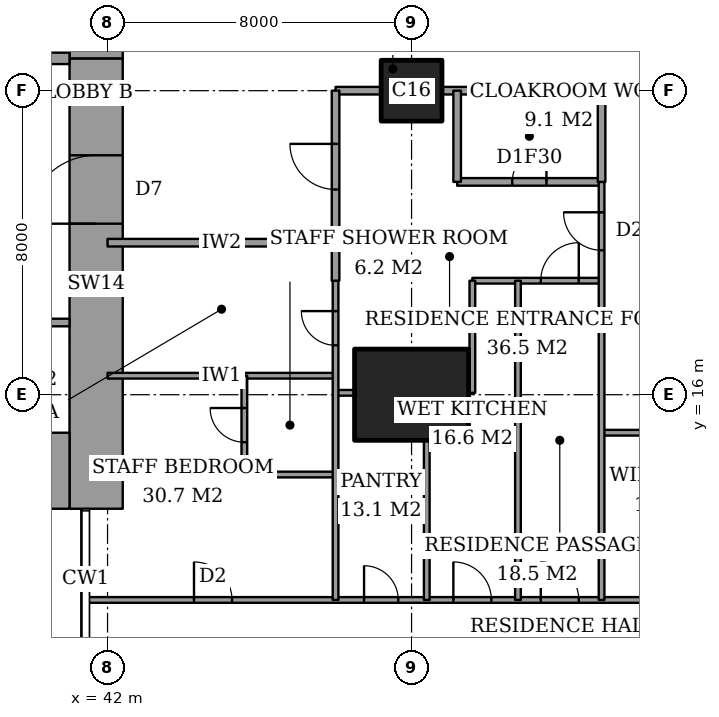
"""IFC4 building model, lengths in metres.
Left out: names, types, materials, properties, quantities, classifications, styles, units other than length and angle.
Written with IfcOpenShell. Run it as: python <this file> out.ifc"""

import sys

from ifc_helpers import new_model, si_unit, direction, frame, frame_2d, origin, origin_2d, place, context, subcontext, project, spatial, rectangle, extrude, element, fill, save


model = new_model("IFC4")
c1 = context("Model", 3, precision=1e-05, world=origin(), true_north=direction((0.0, 1.0)))
c2 = subcontext(c1, "Body", "Model", "MODEL_VIEW")
j1 = project(units=[si_unit("LENGTHUNIT", "METRE"), si_unit("PLANEANGLEUNIT", "RADIAN")], contexts=[c1])
p1 = place(None, origin())
s1 = spatial("IfcSite", under=j1, at=p1, CompositionType="ELEMENT")
p2 = place(p1, origin())
s2 = spatial("IfcBuilding", under=s1, at=p2, CompositionType="ELEMENT")
p3 = place(p2, frame((0.0, 0.0, 244.8)))
s3 = spatial("IfcBuildingStorey", under=s2, at=p3, CompositionType="ELEMENT", Elevation=244.8)
p4 = place(p3, frame((50.0, 16.0, 0.0), z_axis=(0.0, 0.0, 1.0), x_axis=(1.0, 0.0, 0.0)))
e1 = element("IfcColumn", 1, at=p4, inside=s3, PredefinedType="COLUMN", context=c2, shape_type="SweptSolid", body=[
    extrude(rectangle(XDim=3.0, YDim=2.4, at=origin_2d()), origin(), (0.0, 0.0, 1.0), 3.6),
])
p5 = place(p3, frame((50.0, 24.0, 0.0), z_axis=(0.0, 0.0, 1.0), x_axis=(1.0, 0.0, 0.0)))
e2 = element("IfcColumn", 2, at=p5, inside=s3, PredefinedType="COLUMN", context=c2, shape_type="SweptSolid", body=[
    extrude(rectangle(XDim=1.6, YDim=1.6, at=origin_2d()), origin(), (0.0, 0.0, 1.0), 3.6),
])
p6 = place(p3, frame((37.85, 14.0, 0.0), z_axis=(0.0, 0.0, 1.0), x_axis=(1.0, 0.0, 0.0)))
e3 = element("IfcWall", 3, at=p6, inside=s3, PredefinedType="SHEAR", context=c2, shape_type="SweptSolid", body=[
    extrude(rectangle(XDim=3.15, YDim=2.0, at=frame_2d((1.575, 0.0))), origin(), (0.0, 0.0, 1.0), 3.6),
])
p7 = place(p3, frame((41.7, 13.0, 0.0), z_axis=(0.0, 0.0, 1.0), x_axis=(0.0, 1.0, 0.0)))
e4 = element("IfcWall", 4, at=p7, inside=s3, PredefinedType="SHEAR", context=c2, shape_type="SweptSolid", body=[
    extrude(rectangle(XDim=11.85, YDim=1.4, at=frame_2d((5.925, 0.0))), origin(), (0.0, 0.0, 1.0), 3.6),
])
p8 = place(p7, frame((7.5, 0.0, 0.0)))
e5 = element("IfcOpeningElement", 5, at=p8, cuts=e4, PredefinedType="OPENING", context=c2, shape_type="SweptSolid", body=[
    extrude(rectangle(XDim=1.8, YDim=2.4, at=frame_2d((0.9, 1.2))), frame((0.0, 0.71, 0.0), z_axis=(0.0, -1.0, 0.0), x_axis=(1.0, 0.0, 0.0)), (0.0, 0.0, 1.0), 1.42),
])
p9 = place(p3, frame((41.7, 24.85, 0.0), z_axis=(0.0, 0.0, 1.0), x_axis=(0.0, 1.0, 0.0)))
e6 = element("IfcWall", 6, at=p9, inside=s3, PredefinedType="SHEAR", context=c2, shape_type="SweptSolid", body=[
    extrude(rectangle(XDim=10.15, YDim=1.4, at=frame_2d((5.075, 0.0))), origin(), (0.0, 0.0, 1.0), 3.6),
])
p10 = place(p3, frame((37.85, 24.85, 0.0), z_axis=(0.0, 0.0, 1.0), x_axis=(1.0, 0.0, 0.0)))
e7 = element("IfcWall", 7, at=p10, inside=s3, PredefinedType="SHEAR", context=c2, shape_type="SweptSolid", body=[
    extrude(rectangle(XDim=3.15, YDim=0.3, at=frame_2d((1.575, 0.0))), origin(), (0.0, 0.0, 1.0), 3.6),
])
p11 = place(p10, frame((0.95, 0.0, 0.0)))
e8 = element("IfcOpeningElement", 8, at=p11, cuts=e7, PredefinedType="OPENING", context=c2, shape_type="SweptSolid", body=[
    extrude(rectangle(XDim=1.0, YDim=2.1, at=frame_2d((0.5, 1.05))), frame((0.0, 0.16, 0.0), z_axis=(0.0, -1.0, 0.0), x_axis=(1.0, 0.0, 0.0)), (0.0, 0.0, 1.0), 0.32),
])
p12 = place(p3, frame((41.439, 10.6, 0.0), z_axis=(0.0, 0.0, 1.0), x_axis=(1.0, 0.0, 0.0)))
e9 = element("IfcWall", 9, at=p12, inside=s3, PredefinedType="PARTITIONING", context=c2, shape_type="SweptSolid", body=[
    extrude(rectangle(XDim=25.011, YDim=0.15, at=frame_2d((12.505, 0.0))), origin(), (0.0, 0.0, 1.0), 3.35),
])
p13 = place(p12, frame((11.961, 0.0, 0.0)))
e10 = element("IfcOpeningElement", 10, at=p13, cuts=e9, PredefinedType="OPENING", context=c2, shape_type="SweptSolid", body=[
    extrude(rectangle(XDim=1.0, YDim=2.1, at=frame_2d((0.5, 1.05))), frame((0.0, 0.085, 0.0), z_axis=(0.0, -1.0, 0.0), x_axis=(1.0, 0.0, 0.0)), (0.0, 0.0, 1.0), 0.17),
])
p14 = place(p12, frame((20.924, 0.0, 0.0)))
e11 = element("IfcOpeningElement", 11, at=p14, cuts=e9, PredefinedType="OPENING", context=c2, shape_type="SweptSolid", body=[
    extrude(rectangle(XDim=1.0, YDim=2.1, at=frame_2d((0.5, 1.05))), frame((0.0, 0.085, 0.0), z_axis=(0.0, -1.0, 0.0), x_axis=(1.0, 0.0, 0.0)), (0.0, 0.0, 1.0), 0.17),
])
p15 = place(p12, frame((15.249, 0.0, 0.0)))
e12 = element("IfcOpeningElement", 12, at=p15, cuts=e9, PredefinedType="OPENING", context=c2, shape_type="SweptSolid", body=[
    extrude(rectangle(XDim=0.9, YDim=2.1, at=frame_2d((0.45, 1.05))), frame((0.0, 0.085, 0.0), z_axis=(0.0, -1.0, 0.0), x_axis=(1.0, 0.0, 0.0)), (0.0, 0.0, 1.0), 0.17),
])
p16 = place(p12, frame((9.661, 0.0, 0.0)))
e13 = element("IfcOpeningElement", 13, at=p16, cuts=e9, PredefinedType="OPENING", context=c2, shape_type="SweptSolid", body=[
    extrude(rectangle(XDim=1.0, YDim=2.1, at=frame_2d((0.5, 1.05))), frame((0.0, 0.085, 0.0), z_axis=(0.0, -1.0, 0.0), x_axis=(1.0, 0.0, 0.0)), (0.0, 0.0, 1.0), 0.17),
])
p17 = place(p12, frame((7.311, 0.0, 0.0)))
e14 = element("IfcOpeningElement", 14, at=p17, cuts=e9, PredefinedType="OPENING", context=c2, shape_type="SweptSolid", body=[
    extrude(rectangle(XDim=0.9, YDim=2.1, at=frame_2d((0.45, 1.05))), frame((0.0, 0.085, 0.0), z_axis=(0.0, -1.0, 0.0), x_axis=(1.0, 0.0, 0.0)), (0.0, 0.0, 1.0), 0.17),
])
p18 = place(p12, frame((2.836, 0.0, 0.0)))
e15 = element("IfcOpeningElement", 15, at=p18, cuts=e9, PredefinedType="OPENING", context=c2, shape_type="SweptSolid", body=[
    extrude(rectangle(XDim=1.0, YDim=2.1, at=frame_2d((0.5, 1.05))), frame((0.0, 0.085, 0.0), z_axis=(0.0, -1.0, 0.0), x_axis=(1.0, 0.0, 0.0)), (0.0, 0.0, 1.0), 0.17),
])
p19 = place(p3, frame((45.6, 13.9, 0.0), z_axis=(0.0, 0.0, 1.0), x_axis=(1.0, 0.0, 0.0)))
e16 = element("IfcWall", 16, at=p19, inside=s3, PredefinedType="PARTITIONING", context=c2, shape_type="SweptSolid", body=[
    extrude(rectangle(XDim=2.4, YDim=0.15, at=frame_2d((1.2, 0.0))), origin(), (0.0, 0.0, 1.0), 3.35),
])
p20 = place(p3, frame((55.0, 15.0, 0.0), z_axis=(0.0, 0.0, 1.0), x_axis=(1.0, 0.0, 0.0)))
e17 = element("IfcWall", 17, at=p20, inside=s3, PredefinedType="PARTITIONING", context=c2, shape_type="SweptSolid", body=[
    extrude(rectangle(XDim=1.5, YDim=0.15, at=frame_2d((0.75, 0.0))), origin(), (0.0, 0.0, 1.0), 3.35),
])
p21 = place(p3, frame((48.0, 16.05, 0.0), z_axis=(0.0, 0.0, 1.0), x_axis=(1.0, 0.0, 0.0)))
e18 = element("IfcWall", 18, at=p21, inside=s3, PredefinedType="PARTITIONING", context=c2, shape_type="SweptSolid", body=[
    extrude(rectangle(XDim=0.5, YDim=0.15, at=frame_2d((0.25, 0.0))), origin(), (0.0, 0.0, 1.0), 2.634),
])
p22 = place(p3, frame((42.0, 16.5, 0.0), z_axis=(0.0, 0.0, 1.0), x_axis=(1.0, 0.0, 0.0)))
e19 = element("IfcWall", 19, at=p22, inside=s3, PredefinedType="PARTITIONING", context=c2, shape_type="SweptSolid", body=[
    extrude(rectangle(XDim=6.0, YDim=0.15, at=frame_2d((3.0, 0.0))), origin(), (0.0, 0.0, 1.0), 3.35),
])
p23 = place(p3, frame((51.6, 19.0, 0.0), z_axis=(0.0, 0.0, 1.0), x_axis=(1.0, 0.0, 0.0)))
e20 = element("IfcWall", 20, at=p23, inside=s3, PredefinedType="PARTITIONING", context=c2, shape_type="SweptSolid", body=[
    extrude(rectangle(XDim=3.4, YDim=0.15, at=frame_2d((1.7, 0.0))), origin(), (0.0, 0.0, 1.0), 3.35),
])
p24 = place(p23, frame((1.8, 0.0, 0.0)))
e21 = element("IfcOpeningElement", 21, at=p24, cuts=e20, PredefinedType="OPENING", context=c2, shape_type="SweptSolid", body=[
    extrude(rectangle(XDim=1.0, YDim=2.1, at=frame_2d((0.5, 1.05))), frame((0.0, 0.085, 0.0), z_axis=(0.0, -1.0, 0.0), x_axis=(1.0, 0.0, 0.0)), (0.0, 0.0, 1.0), 0.17),
])
p25 = place(p3, frame((42.0, 20.0, 0.0), z_axis=(0.0, 0.0, 1.0), x_axis=(1.0, 0.0, 0.0)))
e22 = element("IfcWall", 22, at=p25, inside=s3, PredefinedType="PARTITIONING", context=c2, shape_type="SweptSolid", body=[
    extrude(rectangle(XDim=6.0, YDim=0.2, at=frame_2d((3.0, 0.0))), origin(), (0.0, 0.0, 1.0), 3.35),
])
p26 = place(p3, frame((51.2, 21.6, 0.0), z_axis=(0.0, 0.0, 1.0), x_axis=(1.0, 0.0, 0.0)))
e23 = element("IfcWall", 23, at=p26, inside=s3, PredefinedType="PARTITIONING", context=c2, shape_type="SweptSolid", body=[
    extrude(rectangle(XDim=3.8, YDim=0.2, at=frame_2d((1.9, 0.0))), origin(), (0.0, 0.0, 1.0), 3.35),
])
p27 = place(p26, frame((1.45, 0.0, 0.0)))
e24 = element("IfcOpeningElement", 24, at=p27, cuts=e23, PredefinedType="OPENING", context=c2, shape_type="SweptSolid", body=[
    extrude(rectangle(XDim=0.9, YDim=2.1, at=frame_2d((0.45, 1.05))), frame((0.0, 0.11, 0.0), z_axis=(0.0, -1.0, 0.0), x_axis=(1.0, 0.0, 0.0)), (0.0, 0.0, 1.0), 0.22),
])
p28 = place(p3, frame((48.0, 24.0, 0.0), z_axis=(0.0, 0.0, 1.0), x_axis=(1.0, 0.0, 0.0)))
e25 = element("IfcWall", 25, at=p28, inside=s3, PredefinedType="PARTITIONING", context=c2, shape_type="SweptSolid", body=[
    extrude(rectangle(XDim=1.2, YDim=0.2, at=frame_2d((0.6, 0.0))), origin(), (0.0, 0.0, 1.0), 3.35),
])
p29 = place(p3, frame((50.8, 24.0, 0.0), z_axis=(0.0, 0.0, 1.0), x_axis=(1.0, 0.0, 0.0)))
e26 = element("IfcWall", 26, at=p29, inside=s3, PredefinedType="PARTITIONING", context=c2, shape_type="SweptSolid", body=[
    extrude(rectangle(XDim=6.4, YDim=0.2, at=frame_2d((3.2, 0.0))), origin(), (0.0, 0.0, 1.0), 3.35),
])
p30 = place(p3, frame((45.6, 13.9, 0.0), z_axis=(0.0, 0.0, 1.0), x_axis=(0.0, 1.0, 0.0)))
e27 = element("IfcWall", 27, at=p30, inside=s3, PredefinedType="PARTITIONING", context=c2, shape_type="SweptSolid", body=[
    extrude(rectangle(XDim=2.6, YDim=0.15, at=frame_2d((1.3, 0.0))), origin(), (0.0, 0.0, 1.0), 3.35),
])
p31 = place(p30, frame((0.85, 0.0, 0.0)))
e28 = element("IfcOpeningElement", 28, at=p31, cuts=e27, PredefinedType="OPENING", context=c2, shape_type="SweptSolid", body=[
    extrude(rectangle(XDim=0.9, YDim=2.1, at=frame_2d((0.45, 1.05))), frame((0.0, 0.085, 0.0), z_axis=(0.0, -1.0, 0.0), x_axis=(1.0, 0.0, 0.0)), (0.0, 0.0, 1.0), 0.17),
])
p32 = place(p3, frame((48.0, 19.0, 0.0), z_axis=(0.0, 0.0, 1.0), x_axis=(0.0, 1.0, 0.0)))
e29 = element("IfcWall", 29, at=p32, inside=s3, PredefinedType="PARTITIONING", context=c2, shape_type="SweptSolid", body=[
    extrude(rectangle(XDim=5.0, YDim=0.2, at=frame_2d((2.5, 0.0))), origin(), (0.0, 0.0, 1.0), 3.35),
])
p33 = place(p32, frame((2.4, 0.0, 0.0)))
e30 = element("IfcOpeningElement", 30, at=p33, cuts=e29, PredefinedType="OPENING", context=c2, shape_type="SweptSolid", body=[
    extrude(rectangle(XDim=1.2, YDim=2.4, at=frame_2d((0.6, 1.2))), frame((0.0, 0.11, 0.0), z_axis=(0.0, -1.0, 0.0), x_axis=(1.0, 0.0, 0.0)), (0.0, 0.0, 1.0), 0.22),
])
p34 = place(p3, frame((48.0, 10.6, 0.0), z_axis=(0.0, 0.0, 1.0), x_axis=(0.0, 1.0, 0.0)))
e31 = element("IfcWall", 31, at=p34, inside=s3, PredefinedType="PARTITIONING", context=c2, shape_type="SweptSolid", body=[
    extrude(rectangle(XDim=8.4, YDim=0.15, at=frame_2d((4.2, 0.0))), origin(), (0.0, 0.0, 1.0), 3.35),
])
p35 = place(p34, frame((6.7, 0.0, 0.0)))
e32 = element("IfcOpeningElement", 32, at=p35, cuts=e31, PredefinedType="OPENING", context=c2, shape_type="SweptSolid", body=[
    extrude(rectangle(XDim=0.9, YDim=2.1, at=frame_2d((0.45, 1.05))), frame((0.0, 0.085, 0.0), z_axis=(0.0, -1.0, 0.0), x_axis=(1.0, 0.0, 0.0)), (0.0, 0.0, 1.0), 0.17),
])
p36 = place(p3, frame((50.4, 10.6, 0.0), z_axis=(0.0, 0.0, 1.0), x_axis=(0.0, 1.0, 0.0)))
e33 = element("IfcWall", 33, at=p36, inside=s3, PredefinedType="PARTITIONING", context=c2, shape_type="SweptSolid", body=[
    extrude(rectangle(XDim=4.2, YDim=0.15, at=frame_2d((2.1, 0.0))), origin(), (0.0, 0.0, 1.0), 3.35),
])
p37 = place(p3, frame((51.2, 21.6, 0.0), z_axis=(0.0, 0.0, 1.0), x_axis=(0.0, 1.0, 0.0)))
e34 = element("IfcWall", 34, at=p37, inside=s3, PredefinedType="PARTITIONING", context=c2, shape_type="SweptSolid", body=[
    extrude(rectangle(XDim=2.4, YDim=0.2, at=frame_2d((1.2, 0.0))), origin(), (0.0, 0.0, 1.0), 3.35),
])
p38 = place(p3, frame((51.6, 16.05, 0.0), z_axis=(0.0, 0.0, 1.0), x_axis=(0.0, 1.0, 0.0)))
e35 = element("IfcWall", 35, at=p38, inside=s3, PredefinedType="PARTITIONING", context=c2, shape_type="SweptSolid", body=[
    extrude(rectangle(XDim=2.95, YDim=0.15, at=frame_2d((1.475, 0.0))), origin(), (0.0, 0.0, 1.0), 3.35),
])
p39 = place(p3, frame((52.8, 10.6, 0.0), z_axis=(0.0, 0.0, 1.0), x_axis=(0.0, 1.0, 0.0)))
e36 = element("IfcWall", 36, at=p39, inside=s3, PredefinedType="PARTITIONING", context=c2, shape_type="SweptSolid", body=[
    extrude(rectangle(XDim=8.4, YDim=0.15, at=frame_2d((4.2, 0.0))), origin(), (0.0, 0.0, 1.0), 3.35),
])
p40 = place(p3, frame((55.0, 21.6, 0.0), z_axis=(0.0, 0.0, 1.0), x_axis=(0.0, 1.0, 0.0)))
e37 = element("IfcWall", 37, at=p40, inside=s3, PredefinedType="PARTITIONING", context=c2, shape_type="SweptSolid", body=[
    extrude(rectangle(XDim=2.4, YDim=0.2, at=frame_2d((1.2, 0.0))), origin(), (0.0, 0.0, 1.0), 3.35),
])
p41 = place(p3, frame((55.0, 10.6, 0.0), z_axis=(0.0, 0.0, 1.0), x_axis=(0.0, 1.0, 0.0)))
e38 = element("IfcWall", 38, at=p41, inside=s3, PredefinedType="PARTITIONING", context=c2, shape_type="SweptSolid", body=[
    extrude(rectangle(XDim=11.0, YDim=0.15, at=frame_2d((5.5, 0.0))), origin(), (0.0, 0.0, 1.0), 3.35),
])
p42 = place(p41, frame((9.2, 0.0, 0.0)))
e39 = element("IfcOpeningElement", 39, at=p42, cuts=e38, PredefinedType="OPENING", context=c2, shape_type="SweptSolid", body=[
    extrude(rectangle(XDim=1.0, YDim=2.1, at=frame_2d((0.5, 1.05))), frame((0.0, 0.085, 0.0), z_axis=(0.0, -1.0, 0.0), x_axis=(1.0, 0.0, 0.0)), (0.0, 0.0, 1.0), 0.17),
])
p43 = place(p3, frame((28.3, 17.9, 0.0), z_axis=(0.0, 0.0, 1.0), x_axis=(1.0, 0.0, 0.0)))
e40 = element("IfcWall", 40, at=p43, inside=s3, PredefinedType="PARTITIONING", context=c2, shape_type="SweptSolid", body=[
    extrude(rectangle(XDim=12.7, YDim=0.2, at=frame_2d((6.35, 0.0))), origin(), (0.0, 0.0, 1.0), 3.6),
])
p44 = place(p43, frame((1.05, 0.0, 0.0)))
e41 = element("IfcOpeningElement", 41, at=p44, cuts=e40, PredefinedType="OPENING", context=c2, shape_type="SweptSolid", body=[
    extrude(rectangle(XDim=0.9, YDim=2.1, at=frame_2d((0.45, 1.05))), frame((0.0, 0.11, 0.0), z_axis=(0.0, -1.0, 0.0), x_axis=(1.0, 0.0, 0.0)), (0.0, 0.0, 1.0), 0.22),
])
p45 = place(p43, frame((10.6, 0.0, 0.0)))
e42 = element("IfcOpeningElement", 42, at=p45, cuts=e40, PredefinedType="OPENING", context=c2, shape_type="SweptSolid", body=[
    extrude(rectangle(XDim=1.2, YDim=2.1, at=frame_2d((0.6, 1.05))), frame((0.0, 0.11, 0.0), z_axis=(0.0, -1.0, 0.0), x_axis=(1.0, 0.0, 0.0)), (0.0, 0.0, 1.0), 0.22),
])
p46 = place(p13, origin())
e43 = element("IfcDoor", 43, at=p46, inside=s3, OperationType="SINGLE_SWING_RIGHT", PredefinedType="DOOR", context=c2, shape_type="SweptSolid", body=[
    extrude(rectangle(XDim=1.0, YDim=2.1, at=frame_2d((0.5, 1.05))), frame((0.0, 0.025, 0.0), z_axis=(0.0, -1.0, 0.0), x_axis=(1.0, 0.0, 0.0)), (0.0, 0.0, 1.0), 0.05),
])
fill(e10, e43)
p47 = place(p42, origin())
e44 = element("IfcDoor", 44, at=p47, inside=s3, OperationType="SINGLE_SWING_LEFT", PredefinedType="DOOR", context=c2, shape_type="SweptSolid", body=[
    extrude(rectangle(XDim=1.0, YDim=2.1, at=frame_2d((0.5, 1.05))), frame((0.0, 0.025, 0.0), z_axis=(0.0, -1.0, 0.0), x_axis=(1.0, 0.0, 0.0)), (0.0, 0.0, 1.0), 0.05),
])
fill(e39, e44)
p48 = place(p27, origin())
e45 = element("IfcDoor", 45, at=p48, inside=s3, OperationType="SINGLE_SWING_LEFT", PredefinedType="DOOR", context=c2, shape_type="SweptSolid", body=[
    extrude(rectangle(XDim=0.9, YDim=2.1, at=frame_2d((0.45, 1.05))), frame((0.0, 0.025, 0.0), z_axis=(0.0, -1.0, 0.0), x_axis=(1.0, 0.0, 0.0)), (0.0, 0.0, 1.0), 0.05),
])
fill(e24, e45)
p49 = place(p33, origin())
e46 = element("IfcDoor", 46, at=p49, inside=s3, OperationType="SINGLE_SWING_LEFT", PredefinedType="DOOR", context=c2, shape_type="SweptSolid", body=[
    extrude(rectangle(XDim=1.2, YDim=2.4, at=frame_2d((0.6, 1.2))), frame((0.0, 0.025, 0.0), z_axis=(0.0, -1.0, 0.0), x_axis=(1.0, 0.0, 0.0)), (0.0, 0.0, 1.0), 0.05),
])
fill(e30, e46)
p50 = place(p24, origin())
e47 = element("IfcDoor", 47, at=p50, inside=s3, OperationType="SINGLE_SWING_LEFT", PredefinedType="DOOR", context=c2, shape_type="SweptSolid", body=[
    extrude(rectangle(XDim=1.0, YDim=2.1, at=frame_2d((0.5, 1.05))), frame((0.0, 0.025, 0.0), z_axis=(0.0, -1.0, 0.0), x_axis=(1.0, 0.0, 0.0)), (0.0, 0.0, 1.0), 0.05),
])
fill(e21, e47)
p51 = place(p16, origin())
e48 = element("IfcDoor", 48, at=p51, inside=s3, OperationType="SINGLE_SWING_RIGHT", PredefinedType="DOOR", context=c2, shape_type="SweptSolid", body=[
    extrude(rectangle(XDim=1.0, YDim=2.1, at=frame_2d((0.5, 1.05))), frame((0.0, 0.025, 0.0), z_axis=(0.0, -1.0, 0.0), x_axis=(1.0, 0.0, 0.0)), (0.0, 0.0, 1.0), 0.05),
])
fill(e13, e48)
p52 = place(p17, origin())
e49 = element("IfcDoor", 49, at=p52, inside=s3, OperationType="SINGLE_SWING_RIGHT", PredefinedType="DOOR", context=c2, shape_type="SweptSolid", body=[
    extrude(rectangle(XDim=0.9, YDim=2.1, at=frame_2d((0.45, 1.05))), frame((0.0, 0.025, 0.0), z_axis=(0.0, -1.0, 0.0), x_axis=(1.0, 0.0, 0.0)), (0.0, 0.0, 1.0), 0.05),
])
fill(e14, e49)
p53 = place(p31, origin())
e50 = element("IfcDoor", 50, at=p53, inside=s3, OperationType="SINGLE_SWING_LEFT", PredefinedType="DOOR", context=c2, shape_type="SweptSolid", body=[
    extrude(rectangle(XDim=0.9, YDim=2.1, at=frame_2d((0.45, 1.05))), frame((0.0, 0.025, 0.0), z_axis=(0.0, -1.0, 0.0), x_axis=(1.0, 0.0, 0.0)), (0.0, 0.0, 1.0), 0.05),
])
fill(e28, e50)
p54 = place(p18, origin())
e51 = element("IfcDoor", 51, at=p54, inside=s3, OperationType="SINGLE_SWING_RIGHT", PredefinedType="DOOR", context=c2, shape_type="SweptSolid", body=[
    extrude(rectangle(XDim=1.0, YDim=2.1, at=frame_2d((0.5, 1.05))), frame((0.0, 0.025, 0.0), z_axis=(0.0, -1.0, 0.0), x_axis=(1.0, 0.0, 0.0)), (0.0, 0.0, 1.0), 0.05),
])
fill(e15, e51)
p55 = place(p35, origin())
e52 = element("IfcDoor", 52, at=p55, inside=s3, OperationType="SINGLE_SWING_LEFT", PredefinedType="DOOR", context=c2, shape_type="SweptSolid", body=[
    extrude(rectangle(XDim=0.9, YDim=2.1, at=frame_2d((0.45, 1.05))), frame((0.0, 0.025, 0.0), z_axis=(0.0, -1.0, 0.0), x_axis=(1.0, 0.0, 0.0)), (0.0, 0.0, 1.0), 0.05),
])
fill(e32, e52)
p56 = place(p8, origin())
e53 = element("IfcDoor", 53, at=p56, inside=s3, OperationType="DOUBLE_DOOR_DOUBLE_SWING", PredefinedType="DOOR", context=c2, shape_type="SweptSolid", body=[
    extrude(rectangle(XDim=1.8, YDim=2.4, at=frame_2d((0.9, 1.2))), frame((0.0, 0.025, 0.0), z_axis=(0.0, -1.0, 0.0), x_axis=(1.0, 0.0, 0.0)), (0.0, 0.0, 1.0), 0.05),
])
fill(e5, e53)
save(model, sys.argv[1])
